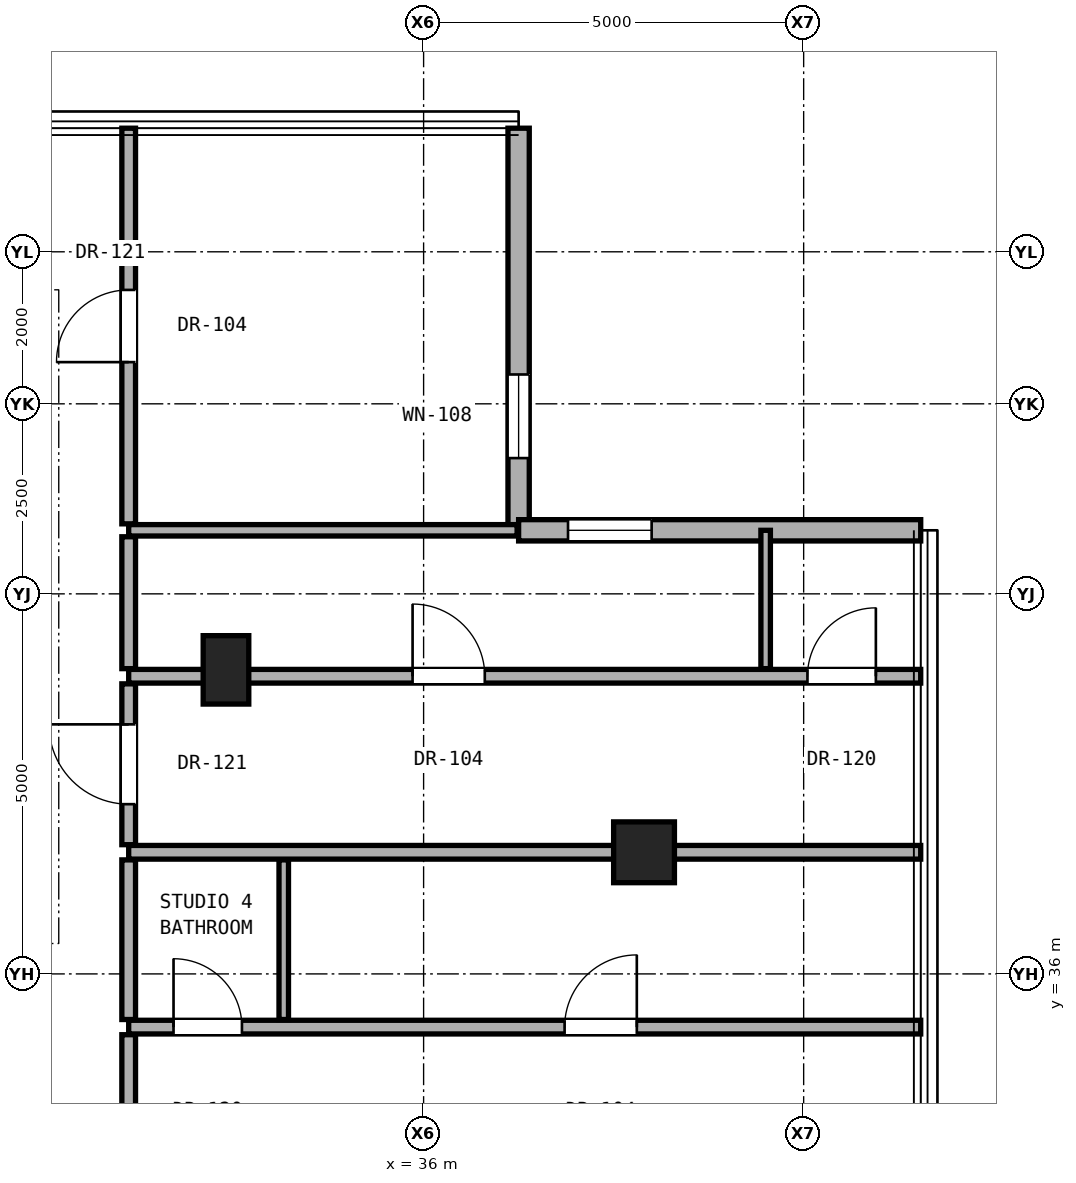
"""IFC4 building model, lengths in metres.
Left out: names, types, materials, properties, quantities, classifications, styles, units other than length and angle.
Written with IfcOpenShell. Run it as: python <this file> out.ifc"""

import sys

from ifc_helpers import new_model, si_unit, direction, frame, frame_2d, origin, origin_2d, place, context, subcontext, project, spatial, rectangle, hollow_rectangle, extrude, element, fill, save


model = new_model("IFC4")
c1 = context("Model", 3, precision=1e-05, world=origin(), true_north=direction((0.0, 1.0)))
c2 = subcontext(c1, "Body", "Model", "MODEL_VIEW")
j1 = project(units=[si_unit("LENGTHUNIT", "METRE"), si_unit("PLANEANGLEUNIT", "RADIAN")], contexts=[c1])
p1 = place(None, origin())
s1 = spatial("IfcSite", under=j1, at=p1, CompositionType="ELEMENT")
p2 = place(p1, origin())
s2 = spatial("IfcBuilding", under=s1, at=p2, CompositionType="ELEMENT")
p3 = place(p2, frame((0.0, 0.0, 242.5)))
s3 = spatial("IfcBuildingStorey", under=s2, at=p3, CompositionType="ELEMENT", Elevation=242.5)
p4 = place(p3, frame((38.9, 37.6, 0.0), z_axis=(0.0, 0.0, 1.0), x_axis=(1.0, 0.0, 0.0)))
e1 = element("IfcColumn", 1, at=p4, inside=s3, PredefinedType="COLUMN", context=c2, shape_type="SweptSolid", body=[
    extrude(hollow_rectangle(XDim=0.8, YDim=0.8, WallThickness=0.045, at=origin_2d()), origin(), (0.0, 0.0, 1.0), 3.3),
])
p5 = place(p3, frame((33.4, 40.0, 0.0), z_axis=(0.0, 0.0, 1.0), x_axis=(1.0, 0.0, 0.0)))
e2 = element("IfcColumn", 2, at=p5, inside=s3, PredefinedType="PILASTER", context=c2, shape_type="SweptSolid", body=[
    extrude(rectangle(XDim=0.6, YDim=0.9, at=origin_2d()), origin(), (0.0, 0.0, 1.0), 3.3),
])
p6 = place(p3, frame((37.25, 41.836, 0.0), z_axis=(0.0, 0.0, 1.0), x_axis=(0.0, 1.0, 0.0)))
e3 = element("IfcWall", 3, at=p6, inside=s3, PredefinedType="SOLIDWALL", context=c2, shape_type="SweptSolid", body=[
    extrude(rectangle(XDim=5.29, YDim=0.28, at=frame_2d((2.645, 0.0))), origin(), (0.0, 0.0, 1.0), 3.08),
])
p7 = place(p6, frame((0.95, 0.0, 0.85)))
e4 = element("IfcOpeningElement", 4, at=p7, cuts=e3, PredefinedType="OPENING", context=c2, shape_type="SweptSolid", body=[
    extrude(rectangle(XDim=1.1, YDim=2.0, at=frame_2d((0.55, 1.0))), frame((0.0, 0.15, 0.0), z_axis=(0.0, -1.0, 0.0), x_axis=(1.0, 0.0, 0.0)), (0.0, 0.0, 1.0), 0.3),
])
p8 = place(p3, frame((42.54, 41.836, 0.0), z_axis=(0.0, 0.0, 1.0), x_axis=(-1.0, 0.0, 0.0)))
e5 = element("IfcWall", 5, at=p8, inside=s3, PredefinedType="SOLIDWALL", context=c2, shape_type="SweptSolid", body=[
    extrude(rectangle(XDim=5.29, YDim=0.28, at=frame_2d((2.645, 0.0))), origin(), (0.0, 0.0, 1.0), 3.08),
])
p9 = place(p8, frame((3.54, 0.0, 0.85)))
e6 = element("IfcOpeningElement", 6, at=p9, cuts=e5, PredefinedType="OPENING", context=c2, shape_type="SweptSolid", body=[
    extrude(rectangle(XDim=1.1, YDim=2.0, at=frame_2d((0.55, 1.0))), frame((0.0, 0.15, 0.0), z_axis=(0.0, -1.0, 0.0), x_axis=(1.0, 0.0, 0.0)), (0.0, 0.0, 1.0), 0.3),
])
p10 = place(p3, frame((32.12, 35.3, 0.0), z_axis=(0.0, 0.0, 1.0), x_axis=(1.0, 0.0, 0.0)))
e7 = element("IfcWall", 7, at=p10, inside=s3, PredefinedType="PARTITIONING", context=c2, shape_type="SweptSolid", body=[
    extrude(rectangle(XDim=10.42, YDim=0.18, at=frame_2d((5.21, 0.0))), origin(), (0.0, 0.0, 1.0), 2.319),
])
p11 = place(p10, frame((5.735, 0.0, 0.0)))
e8 = element("IfcOpeningElement", 8, at=p11, cuts=e7, PredefinedType="OPENING", context=c2, shape_type="SweptSolid", body=[
    extrude(rectangle(XDim=0.95, YDim=2.15, at=frame_2d((0.475, 1.075))), frame((0.0, 0.1, 0.0), z_axis=(0.0, -1.0, 0.0), x_axis=(1.0, 0.0, 0.0)), (0.0, 0.0, 1.0), 0.2),
])
p12 = place(p10, frame((0.59, 0.0, 0.0)))
e9 = element("IfcOpeningElement", 9, at=p12, cuts=e7, PredefinedType="OPENING", context=c2, shape_type="SweptSolid", body=[
    extrude(rectangle(XDim=0.9, YDim=2.1, at=frame_2d((0.45, 1.05))), frame((0.0, 0.1, 0.0), z_axis=(0.0, -1.0, 0.0), x_axis=(1.0, 0.0, 0.0)), (0.0, 0.0, 1.0), 0.2),
])
p13 = place(p3, frame((32.12, 37.6, 0.0), z_axis=(0.0, 0.0, 1.0), x_axis=(1.0, 0.0, 0.0)))
e10 = element("IfcWall", 10, at=p13, inside=s3, PredefinedType="PARTITIONING", context=c2, shape_type="SweptSolid", body=[
    extrude(rectangle(XDim=10.42, YDim=0.18, at=frame_2d((5.21, 0.0))), origin(), (0.0, 0.0, 1.0), 2.319),
])
p14 = place(p3, frame((32.12, 39.916, 0.0), z_axis=(0.0, 0.0, 1.0), x_axis=(1.0, 0.0, 0.0)))
e11 = element("IfcWall", 11, at=p14, inside=s3, PredefinedType="PARTITIONING", context=c2, shape_type="SweptSolid", body=[
    extrude(rectangle(XDim=10.42, YDim=0.18, at=frame_2d((5.21, 0.0))), origin(), (0.0, 0.0, 1.0), 2.543),
])
p15 = place(p14, frame((3.735, 0.0, 0.0)))
e12 = element("IfcOpeningElement", 12, at=p15, cuts=e11, PredefinedType="OPENING", context=c2, shape_type="SweptSolid", body=[
    extrude(rectangle(XDim=0.95, YDim=2.15, at=frame_2d((0.475, 1.075))), frame((0.0, 0.1, 0.0), z_axis=(0.0, -1.0, 0.0), x_axis=(1.0, 0.0, 0.0)), (0.0, 0.0, 1.0), 0.2),
])
p16 = place(p14, frame((8.93, 0.0, 0.0)))
e13 = element("IfcOpeningElement", 13, at=p16, cuts=e11, PredefinedType="OPENING", context=c2, shape_type="SweptSolid", body=[
    extrude(rectangle(XDim=0.9, YDim=2.1, at=frame_2d((0.45, 1.05))), frame((0.0, 0.1, 0.0), z_axis=(0.0, -1.0, 0.0), x_axis=(1.0, 0.0, 0.0)), (0.0, 0.0, 1.0), 0.2),
])
p17 = place(p3, frame((32.12, 41.836, 0.0), z_axis=(0.0, 0.0, 1.0), x_axis=(1.0, 0.0, 0.0)))
e14 = element("IfcWall", 14, at=p17, inside=s3, PredefinedType="PARTITIONING", context=c2, shape_type="SweptSolid", body=[
    extrude(rectangle(XDim=5.11, YDim=0.15, at=frame_2d((2.555, 0.0))), origin(), (0.0, 0.0, 1.0), 3.1),
])
p18 = place(p3, frame((32.12, 31.3, 0.0), z_axis=(0.0, 0.0, 1.0), x_axis=(0.0, 1.0, 0.0)))
e15 = element("IfcWall", 15, at=p18, inside=s3, PredefinedType="PARTITIONING", context=c2, shape_type="SweptSolid", body=[
    extrude(rectangle(XDim=3.9, YDim=0.18, at=frame_2d((1.95, 0.0))), origin(), (0.0, 0.0, 1.0), 2.396),
])
p19 = place(p18, frame((1.425, 0.0, 0.0)))
e16 = element("IfcOpeningElement", 16, at=p19, cuts=e15, PredefinedType="OPENING", context=c2, shape_type="SweptSolid", body=[
    extrude(rectangle(XDim=1.05, YDim=2.2, at=frame_2d((0.525, 1.1))), frame((0.0, 0.1, 0.0), z_axis=(0.0, -1.0, 0.0), x_axis=(1.0, 0.0, 0.0)), (0.0, 0.0, 1.0), 0.2),
])
p20 = place(p3, frame((32.12, 35.4, 0.0), z_axis=(0.0, 0.0, 1.0), x_axis=(0.0, 1.0, 0.0)))
e17 = element("IfcWall", 17, at=p20, inside=s3, PredefinedType="PARTITIONING", context=c2, shape_type="SweptSolid", body=[
    extrude(rectangle(XDim=2.1, YDim=0.18, at=frame_2d((1.05, 0.0))), origin(), (0.0, 0.0, 1.0), 2.492),
])
p21 = place(p3, frame((32.12, 37.7, 0.0), z_axis=(0.0, 0.0, 1.0), x_axis=(0.0, 1.0, 0.0)))
e18 = element("IfcWall", 18, at=p21, inside=s3, PredefinedType="PARTITIONING", context=c2, shape_type="SweptSolid", body=[
    extrude(rectangle(XDim=2.116, YDim=0.18, at=frame_2d((1.058, 0.0))), origin(), (0.0, 0.0, 1.0), 2.492),
])
p22 = place(p21, frame((0.533, 0.0, 0.0)))
e19 = element("IfcOpeningElement", 19, at=p22, cuts=e18, PredefinedType="OPENING", context=c2, shape_type="SweptSolid", body=[
    extrude(rectangle(XDim=1.05, YDim=2.2, at=frame_2d((0.525, 1.1))), frame((0.0, 0.1, 0.0), z_axis=(0.0, -1.0, 0.0), x_axis=(1.0, 0.0, 0.0)), (0.0, 0.0, 1.0), 0.2),
])
p23 = place(p3, frame((32.12, 40.016, 0.0), z_axis=(0.0, 0.0, 1.0), x_axis=(0.0, 1.0, 0.0)))
e20 = element("IfcWall", 20, at=p23, inside=s3, PredefinedType="PARTITIONING", context=c2, shape_type="SweptSolid", body=[
    extrude(rectangle(XDim=1.735, YDim=0.18, at=frame_2d((0.867, 0.0))), origin(), (0.0, 0.0, 1.0), 3.1),
])
p24 = place(p3, frame((32.12, 41.921, 0.0), z_axis=(0.0, 0.0, 1.0), x_axis=(0.0, 1.0, 0.0)))
e21 = element("IfcWall", 21, at=p24, inside=s3, PredefinedType="PARTITIONING", context=c2, shape_type="SweptSolid", body=[
    extrude(rectangle(XDim=5.205, YDim=0.18, at=frame_2d((2.603, 0.0))), origin(), (0.0, 0.0, 1.0), 3.1),
])
p25 = place(p24, frame((2.127, 0.0, 0.0)))
e22 = element("IfcOpeningElement", 22, at=p25, cuts=e21, PredefinedType="OPENING", context=c2, shape_type="SweptSolid", body=[
    extrude(rectangle(XDim=0.95, YDim=2.15, at=frame_2d((0.475, 1.075))), frame((0.0, 0.1, 0.0), z_axis=(0.0, -1.0, 0.0), x_axis=(1.0, 0.0, 0.0)), (0.0, 0.0, 1.0), 0.2),
])
p26 = place(p3, frame((34.16, 35.4, 0.0), z_axis=(0.0, 0.0, 1.0), x_axis=(0.0, 1.0, 0.0)))
e23 = element("IfcWall", 23, at=p26, inside=s3, PredefinedType="PARTITIONING", context=c2, shape_type="SweptSolid", body=[
    extrude(rectangle(XDim=2.1, YDim=0.125, at=frame_2d((1.05, 0.0))), origin(), (0.0, 0.0, 1.0), 2.492),
])
p27 = place(p3, frame((40.5, 40.016, 0.0), z_axis=(0.0, 0.0, 1.0), x_axis=(0.0, 1.0, 0.0)))
e24 = element("IfcWall", 24, at=p27, inside=s3, PredefinedType="PARTITIONING", context=c2, shape_type="SweptSolid", body=[
    extrude(rectangle(XDim=1.82, YDim=0.125, at=frame_2d((0.91, 0.0))), origin(), (0.0, 0.0, 1.0), 3.1),
])
p28 = place(p7, origin())
e25 = element("IfcWindow", 25, at=p28, inside=s3, PartitioningType="SINGLE_PANEL", PredefinedType="WINDOW", context=c2, shape_type="SweptSolid", body=[
    extrude(rectangle(XDim=1.1, YDim=2.0, at=frame_2d((0.55, 1.0))), frame((0.0, 0.03, 0.0), z_axis=(0.0, -1.0, 0.0), x_axis=(1.0, 0.0, 0.0)), (0.0, 0.0, 1.0), 0.06),
])
fill(e4, e25)
p29 = place(p9, origin())
e26 = element("IfcWindow", 26, at=p29, inside=s3, PartitioningType="SINGLE_PANEL", PredefinedType="WINDOW", context=c2, shape_type="SweptSolid", body=[
    extrude(rectangle(XDim=1.1, YDim=2.0, at=frame_2d((0.55, 1.0))), frame((0.0, 0.03, 0.0), z_axis=(0.0, -1.0, 0.0), x_axis=(1.0, 0.0, 0.0)), (0.0, 0.0, 1.0), 0.06),
])
fill(e6, e26)
p30 = place(p11, origin())
e27 = element("IfcDoor", 27, at=p30, inside=s3, OperationType="SINGLE_SWING_RIGHT", PredefinedType="DOOR", context=c2, shape_type="SweptSolid", body=[
    extrude(rectangle(XDim=0.95, YDim=2.15, at=frame_2d((0.475, 1.075))), frame((0.0, 0.025, 0.0), z_axis=(0.0, -1.0, 0.0), x_axis=(1.0, 0.0, 0.0)), (0.0, 0.0, 1.0), 0.05),
])
fill(e8, e27)
p31 = place(p12, origin())
e28 = element("IfcDoor", 28, at=p31, inside=s3, OperationType="SINGLE_SWING_LEFT", PredefinedType="DOOR", context=c2, shape_type="SweptSolid", body=[
    extrude(rectangle(XDim=0.9, YDim=2.1, at=frame_2d((0.45, 1.05))), frame((0.0, 0.025, 0.0), z_axis=(0.0, -1.0, 0.0), x_axis=(1.0, 0.0, 0.0)), (0.0, 0.0, 1.0), 0.05),
])
fill(e9, e28)
p32 = place(p22, origin())
e29 = element("IfcDoor", 29, at=p32, inside=s3, OperationType="SINGLE_SWING_RIGHT", PredefinedType="DOOR", context=c2, shape_type="SweptSolid", body=[
    extrude(rectangle(XDim=1.05, YDim=2.2, at=frame_2d((0.525, 1.1))), frame((0.0, 0.025, 0.0), z_axis=(0.0, -1.0, 0.0), x_axis=(1.0, 0.0, 0.0)), (0.0, 0.0, 1.0), 0.05),
])
fill(e19, e29)
p33 = place(p15, origin())
e30 = element("IfcDoor", 30, at=p33, inside=s3, OperationType="SINGLE_SWING_LEFT", PredefinedType="DOOR", context=c2, shape_type="SweptSolid", body=[
    extrude(rectangle(XDim=0.95, YDim=2.15, at=frame_2d((0.475, 1.075))), frame((0.0, 0.025, 0.0), z_axis=(0.0, -1.0, 0.0), x_axis=(1.0, 0.0, 0.0)), (0.0, 0.0, 1.0), 0.05),
])
fill(e12, e30)
p34 = place(p16, origin())
e31 = element("IfcDoor", 31, at=p34, inside=s3, OperationType="SINGLE_SWING_RIGHT", PredefinedType="DOOR", context=c2, shape_type="SweptSolid", body=[
    extrude(rectangle(XDim=0.9, YDim=2.1, at=frame_2d((0.45, 1.05))), frame((0.0, 0.025, 0.0), z_axis=(0.0, -1.0, 0.0), x_axis=(1.0, 0.0, 0.0)), (0.0, 0.0, 1.0), 0.05),
])
fill(e13, e31)
p35 = place(p25, origin())
e32 = element("IfcDoor", 32, at=p35, inside=s3, OperationType="SINGLE_SWING_LEFT", PredefinedType="DOOR", context=c2, shape_type="SweptSolid", body=[
    extrude(rectangle(XDim=0.95, YDim=2.15, at=frame_2d((0.475, 1.075))), frame((0.0, 0.025, 0.0), z_axis=(0.0, -1.0, 0.0), x_axis=(1.0, 0.0, 0.0)), (0.0, 0.0, 1.0), 0.05),
])
fill(e22, e32)
save(model, sys.argv[1])
